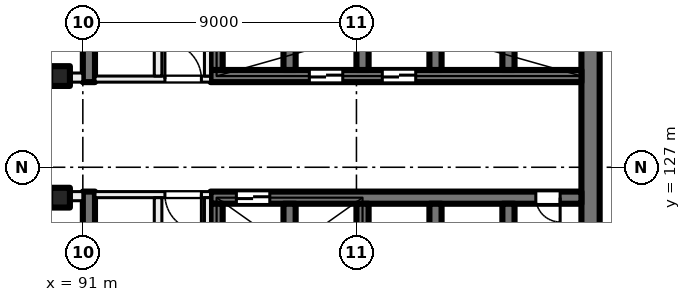
"""IFC4 building model, lengths in metres.
Left out: names, types, materials, properties, quantities, classifications, styles, units other than length and angle.
Written with IfcOpenShell. Run it as: python <this file> out.ifc"""

import sys

from ifc_helpers import new_model, si_unit, direction, frame, frame_2d, origin, origin_2d, place, context, subcontext, project, spatial, rectangle, extrude, element, fill, save


model = new_model("IFC4")
c1 = context("Model", 3, precision=1e-05, world=origin(), true_north=direction((0.0, 1.0)))
c2 = subcontext(c1, "Body", "Model", "MODEL_VIEW")
j1 = project(units=[si_unit("LENGTHUNIT", "METRE"), si_unit("PLANEANGLEUNIT", "RADIAN")], contexts=[c1])
p1 = place(None, origin())
s1 = spatial("IfcSite", under=j1, at=p1, CompositionType="ELEMENT")
p2 = place(p1, origin())
s2 = spatial("IfcBuilding", under=s1, at=p2, CompositionType="ELEMENT")
p3 = place(p2, frame((0.0, 0.0, 81.0)))
s3 = spatial("IfcBuildingStorey", under=s2, at=p3, CompositionType="ELEMENT", Elevation=81.0)
for number, where, z_axis, x_axis in (
    (1, (90.25, 130.0, 0.0), (0.0, 0.0, 1.0), (1.0, 0.0, 0.0)),
    (2, (90.25, 126.0, 0.0), (0.0, 0.0, 1.0), (1.0, 0.0, 0.0)),
):
    element("IfcColumn", number, at=place(p3, frame(where, z_axis=z_axis, x_axis=x_axis)), inside=s3, PredefinedType="COLUMN", context=c2, shape_type="SweptSolid", body=[
        extrude(rectangle(XDim=0.65, YDim=0.65, at=origin_2d()), origin(), (0.0, 0.0, 1.0), 4.0),
    ])
p4 = place(p3, frame((107.7, 135.2, 0.0), z_axis=(0.0, 0.0, 1.0), x_axis=(0.0, -1.0, 0.0)))
e3 = element("IfcWall", 3, at=p4, inside=s3, PredefinedType="SHEAR", context=c2, shape_type="SweptSolid", body=[
    extrude(rectangle(XDim=14.4, YDim=0.6, at=frame_2d((7.2, 0.0))), origin(), (0.0, 0.0, 1.0), 4.0),
])
p5 = place(p3, frame((107.4, 130.0, 0.0), z_axis=(0.0, 0.0, 1.0), x_axis=(-1.0, 0.0, 0.0)))
e4 = element("IfcWall", 4, at=p5, inside=s3, PredefinedType="SHEAR", context=c2, shape_type="SweptSolid", body=[
    extrude(rectangle(XDim=12.2, YDim=0.4, at=frame_2d((6.1, 0.0))), origin(), (0.0, 0.0, 1.0), 4.0),
])
p6 = place(p5, frame((5.45, 0.0, 0.0)))
e5 = element("IfcOpeningElement", 5, at=p6, cuts=e4, PredefinedType="OPENING", context=c2, shape_type="SweptSolid", body=[
    extrude(rectangle(XDim=1.1, YDim=2.1, at=frame_2d((0.55, 1.05))), frame((0.0, 0.21, 0.0), z_axis=(0.0, -1.0, 0.0), x_axis=(1.0, 0.0, 0.0)), (0.0, 0.0, 1.0), 0.42),
])
p7 = place(p5, frame((7.85, 0.0, 0.0)))
e6 = element("IfcOpeningElement", 6, at=p7, cuts=e4, PredefinedType="OPENING", context=c2, shape_type="SweptSolid", body=[
    extrude(rectangle(XDim=1.1, YDim=2.1, at=frame_2d((0.55, 1.05))), frame((0.0, 0.21, 0.0), z_axis=(0.0, -1.0, 0.0), x_axis=(1.0, 0.0, 0.0)), (0.0, 0.0, 1.0), 0.42),
])
for number, where, z_axis, x_axis in (
    (7, (105.0, 133.2, 0.0), (0.0, 0.0, 1.0), (0.0, -1.0, 0.0)),
    (8, (102.6, 133.2, 0.0), (0.0, 0.0, 1.0), (0.0, -1.0, 0.0)),
    (9, (100.2, 133.2, 0.0), (0.0, 0.0, 1.0), (0.0, -1.0, 0.0)),
    (10, (97.8, 133.2, 0.0), (0.0, 0.0, 1.0), (0.0, -1.0, 0.0)),
    (11, (95.4, 133.2, 0.0), (0.0, 0.0, 1.0), (0.0, -1.0, 0.0)),
):
    element("IfcWall", number, at=place(p3, frame(where, z_axis=z_axis, x_axis=x_axis)), inside=s3, PredefinedType="SHEAR", context=c2, shape_type="SweptSolid", body=[
        extrude(rectangle(XDim=3.0, YDim=0.4, at=frame_2d((1.5, 0.0))), origin(), (0.0, 0.0, 1.0), 4.0),
    ])
p8 = place(p3, frame((107.4, 126.0, 0.0), z_axis=(0.0, 0.0, 1.0), x_axis=(-1.0, 0.0, 0.0)))
e12 = element("IfcWall", 12, at=p8, inside=s3, PredefinedType="SHEAR", context=c2, shape_type="SweptSolid", body=[
    extrude(rectangle(XDim=12.2, YDim=0.4, at=frame_2d((6.1, 0.0))), origin(), (0.0, 0.0, 1.0), 4.0),
])
p9 = place(p8, frame((10.25, 0.0, 0.0)))
e13 = element("IfcOpeningElement", 13, at=p9, cuts=e12, PredefinedType="OPENING", context=c2, shape_type="SweptSolid", body=[
    extrude(rectangle(XDim=1.1, YDim=2.1, at=frame_2d((0.55, 1.05))), frame((0.0, 0.21, 0.0), z_axis=(0.0, -1.0, 0.0), x_axis=(1.0, 0.0, 0.0)), (0.0, 0.0, 1.0), 0.42),
])
p10 = place(p8, frame((0.7, 0.0, 0.0)))
e14 = element("IfcOpeningElement", 14, at=p10, cuts=e12, PredefinedType="OPENING", context=c2, shape_type="SweptSolid", body=[
    extrude(rectangle(XDim=0.8, YDim=2.1, at=frame_2d((0.4, 1.05))), frame((0.0, 0.21, 0.0), z_axis=(0.0, -1.0, 0.0), x_axis=(1.0, 0.0, 0.0)), (0.0, 0.0, 1.0), 0.42),
])
for number, where, z_axis, x_axis in (
    (15, (105.0, 125.8, 0.0), (0.0, 0.0, 1.0), (0.0, -1.0, 0.0)),
    (16, (102.6, 125.8, 0.0), (0.0, 0.0, 1.0), (0.0, -1.0, 0.0)),
    (17, (100.2, 125.8, 0.0), (0.0, 0.0, 1.0), (0.0, -1.0, 0.0)),
    (18, (97.8, 125.8, 0.0), (0.0, 0.0, 1.0), (0.0, -1.0, 0.0)),
    (19, (95.4, 125.8, 0.0), (0.0, 0.0, 1.0), (0.0, -1.0, 0.0)),
):
    element("IfcWall", number, at=place(p3, frame(where, z_axis=z_axis, x_axis=x_axis)), inside=s3, PredefinedType="SHEAR", context=c2, shape_type="SweptSolid", body=[
        extrude(rectangle(XDim=3.0, YDim=0.4, at=frame_2d((1.5, 0.0))), origin(), (0.0, 0.0, 1.0), 4.0),
    ])
for number, where, z_axis, x_axis in (
    (20, (91.2, 138.4, 0.0), (0.0, 0.0, 1.0), (0.0, -1.0, 0.0)),
    (21, (91.2, 126.2, 0.0), (0.0, 0.0, 1.0), (0.0, -1.0, 0.0)),
):
    element("IfcWall", number, at=place(p3, frame(where, z_axis=z_axis, x_axis=x_axis)), inside=s3, PredefinedType="SHEAR", context=c2, shape_type="SweptSolid", body=[
        extrude(rectangle(XDim=8.6, YDim=0.4, at=frame_2d((4.3, 0.0))), origin(), (0.0, 0.0, 1.0), 4.0),
    ])
p11 = place(p3, frame((95.2, 126.1, 0.0), z_axis=(0.0, 0.0, 1.0), x_axis=(-1.0, 0.0, 0.0)))
e22 = element("IfcWall", 22, at=p11, inside=s3, PredefinedType="PARTITIONING", context=c2, shape_type="SweptSolid", body=[
    extrude(rectangle(XDim=3.8, YDim=0.2, at=frame_2d((1.9, 0.0))), origin(), (0.0, 0.0, 1.0), 3.625),
])
p12 = place(p11, frame((0.3, 0.0, 0.0)))
e23 = element("IfcOpeningElement", 23, at=p12, cuts=e22, PredefinedType="OPENING", context=c2, shape_type="SweptSolid", body=[
    extrude(rectangle(XDim=1.2, YDim=2.1, at=frame_2d((0.6, 1.05))), frame((0.0, 0.11, 0.0), z_axis=(0.0, -1.0, 0.0), x_axis=(1.0, 0.0, 0.0)), (0.0, 0.0, 1.0), 0.22),
])
p13 = place(p3, frame((95.1, 117.6, 0.0), z_axis=(0.0, 0.0, 1.0), x_axis=(0.0, 1.0, 0.0)))
e24 = element("IfcWall", 24, at=p13, inside=s3, PredefinedType="PARTITIONING", context=c2, shape_type="SweptSolid", body=[
    extrude(rectangle(XDim=8.4, YDim=0.2, at=frame_2d((4.2, 0.0))), origin(), (0.0, 0.0, 1.0), 3.625),
])
p14 = place(p13, frame((1.65, 0.0, 0.0)))
e25 = element("IfcOpeningElement", 25, at=p14, cuts=e24, PredefinedType="OPENING", context=c2, shape_type="SweptSolid", body=[
    extrude(rectangle(XDim=1.5, YDim=2.1, at=frame_2d((0.75, 1.05))), frame((0.0, 0.11, 0.0), z_axis=(0.0, -1.0, 0.0), x_axis=(1.0, 0.0, 0.0)), (0.0, 0.0, 1.0), 0.22),
])
p15 = place(p3, frame((93.475, 117.6, 0.0), z_axis=(0.0, 0.0, 1.0), x_axis=(0.0, 1.0, 0.0)))
e26 = element("IfcWall", 26, at=p15, inside=s3, PredefinedType="PARTITIONING", context=c2, shape_type="SweptSolid", body=[
    extrude(rectangle(XDim=8.4, YDim=0.25, at=frame_2d((4.2, 0.0))), origin(), (0.0, 0.0, 1.0), 3.625),
])
p16 = place(p15, frame((5.925, 0.0, 0.0)))
e27 = element("IfcOpeningElement", 27, at=p16, cuts=e26, PredefinedType="OPENING", context=c2, shape_type="SweptSolid", body=[
    extrude(rectangle(XDim=0.8, YDim=2.1, at=frame_2d((0.4, 1.05))), frame((0.0, 0.135, 0.0), z_axis=(0.0, -1.0, 0.0), x_axis=(1.0, 0.0, 0.0)), (0.0, 0.0, 1.0), 0.27),
])
p17 = place(p15, frame((1.575, 0.0, 0.0)))
e28 = element("IfcOpeningElement", 28, at=p17, cuts=e26, PredefinedType="OPENING", context=c2, shape_type="SweptSolid", body=[
    extrude(rectangle(XDim=1.0, YDim=2.1, at=frame_2d((0.5, 1.05))), frame((0.0, 0.135, 0.0), z_axis=(0.0, -1.0, 0.0), x_axis=(1.0, 0.0, 0.0)), (0.0, 0.0, 1.0), 0.27),
])
p18 = place(p3, frame((91.4, 129.9, 0.0), z_axis=(0.0, 0.0, 1.0), x_axis=(1.0, 0.0, 0.0)))
e29 = element("IfcWall", 29, at=p18, inside=s3, PredefinedType="PARTITIONING", context=c2, shape_type="SweptSolid", body=[
    extrude(rectangle(XDim=3.8, YDim=0.2, at=frame_2d((1.9, 0.0))), origin(), (0.0, 0.0, 1.0), 3.625),
])
p19 = place(p18, frame((2.3, 0.0, 0.0)))
e30 = element("IfcOpeningElement", 30, at=p19, cuts=e29, PredefinedType="OPENING", context=c2, shape_type="SweptSolid", body=[
    extrude(rectangle(XDim=1.2, YDim=2.1, at=frame_2d((0.6, 1.05))), frame((0.0, 0.11, 0.0), z_axis=(0.0, -1.0, 0.0), x_axis=(1.0, 0.0, 0.0)), (0.0, 0.0, 1.0), 0.22),
])
p20 = place(p3, frame((95.1, 130.0, 0.0), z_axis=(0.0, 0.0, 1.0), x_axis=(0.0, 1.0, 0.0)))
e31 = element("IfcWall", 31, at=p20, inside=s3, PredefinedType="PARTITIONING", context=c2, shape_type="SweptSolid", body=[
    extrude(rectangle(XDim=8.4, YDim=0.2, at=frame_2d((4.2, 0.0))), origin(), (0.0, 0.0, 1.0), 3.625),
])
p21 = place(p20, frame((5.25, 0.0, 0.0)))
e32 = element("IfcOpeningElement", 32, at=p21, cuts=e31, PredefinedType="OPENING", context=c2, shape_type="SweptSolid", body=[
    extrude(rectangle(XDim=1.5, YDim=2.1, at=frame_2d((0.75, 1.05))), frame((0.0, 0.11, 0.0), z_axis=(0.0, -1.0, 0.0), x_axis=(1.0, 0.0, 0.0)), (0.0, 0.0, 1.0), 0.22),
])
p22 = place(p3, frame((93.475, 130.0, 0.0), z_axis=(0.0, 0.0, 1.0), x_axis=(0.0, 1.0, 0.0)))
e33 = element("IfcWall", 33, at=p22, inside=s3, PredefinedType="PARTITIONING", context=c2, shape_type="SweptSolid", body=[
    extrude(rectangle(XDim=8.4, YDim=0.25, at=frame_2d((4.2, 0.0))), origin(), (0.0, 0.0, 1.0), 3.625),
])
p23 = place(p22, frame((3.8, 0.0, 0.0)))
e34 = element("IfcOpeningElement", 34, at=p23, cuts=e33, PredefinedType="OPENING", context=c2, shape_type="SweptSolid", body=[
    extrude(rectangle(XDim=0.8, YDim=2.1, at=frame_2d((0.4, 1.05))), frame((0.0, 0.135, 0.0), z_axis=(0.0, -1.0, 0.0), x_axis=(1.0, 0.0, 0.0)), (0.0, 0.0, 1.0), 0.27),
])
p24 = place(p3, frame((72.5, 129.95, 0.0), z_axis=(0.0, 0.0, 1.0), x_axis=(1.0, 0.0, 0.0)))
e35 = element("IfcWall", 35, at=p24, inside=s3, PredefinedType="PARTITIONING", context=c2, shape_type="SweptSolid", body=[
    extrude(rectangle(XDim=18.5, YDim=0.3, at=frame_2d((9.25, 0.0))), origin(), (0.0, 0.0, 1.0), 3.625),
])
p25 = place(p24, frame((14.375, 0.0, 0.0)))
e36 = element("IfcOpeningElement", 36, at=p25, cuts=e35, PredefinedType="OPENING", context=c2, shape_type="SweptSolid", body=[
    extrude(rectangle(XDim=1.0, YDim=2.1, at=frame_2d((0.5, 1.05))), frame((0.0, 0.16, 0.0), z_axis=(0.0, -1.0, 0.0), x_axis=(1.0, 0.0, 0.0)), (0.0, 0.0, 1.0), 0.32),
])
p26 = place(p24, frame((6.0, 0.0, 0.0)))
e37 = element("IfcOpeningElement", 37, at=p26, cuts=e35, PredefinedType="OPENING", context=c2, shape_type="SweptSolid", body=[
    extrude(rectangle(XDim=1.0, YDim=2.1, at=frame_2d((0.5, 1.05))), frame((0.0, 0.16, 0.0), z_axis=(0.0, -1.0, 0.0), x_axis=(1.0, 0.0, 0.0)), (0.0, 0.0, 1.0), 0.32),
])
p27 = place(p24, frame((1.625, 0.0, 0.0)))
e38 = element("IfcOpeningElement", 38, at=p27, cuts=e35, PredefinedType="OPENING", context=c2, shape_type="SweptSolid", body=[
    extrude(rectangle(XDim=1.0, YDim=2.1, at=frame_2d((0.5, 1.05))), frame((0.0, 0.16, 0.0), z_axis=(0.0, -1.0, 0.0), x_axis=(1.0, 0.0, 0.0)), (0.0, 0.0, 1.0), 0.32),
])
p28 = place(p3, frame((91.0, 126.05, 0.0), z_axis=(0.0, 0.0, 1.0), x_axis=(-1.0, 0.0, 0.0)))
e39 = element("IfcWall", 39, at=p28, inside=s3, PredefinedType="PARTITIONING", context=c2, shape_type="SweptSolid", body=[
    extrude(rectangle(XDim=43.785, YDim=0.3, at=frame_2d((21.893, 0.0))), origin(), (0.0, 0.0, 1.0), 3.625),
])
p29 = place(p28, frame((2.025, 0.0, 0.0)))
e40 = element("IfcOpeningElement", 40, at=p29, cuts=e39, PredefinedType="OPENING", context=c2, shape_type="SweptSolid", body=[
    extrude(rectangle(XDim=1.2, YDim=2.1, at=frame_2d((0.6, 1.05))), frame((0.0, 0.16, 0.0), z_axis=(0.0, -1.0, 0.0), x_axis=(1.0, 0.0, 0.0)), (0.0, 0.0, 1.0), 0.32),
])
p30 = place(p28, frame((7.0, 0.0, 0.0)))
e41 = element("IfcOpeningElement", 41, at=p30, cuts=e39, PredefinedType="OPENING", context=c2, shape_type="SweptSolid", body=[
    extrude(rectangle(XDim=1.0, YDim=2.1, at=frame_2d((0.5, 1.05))), frame((0.0, 0.16, 0.0), z_axis=(0.0, -1.0, 0.0), x_axis=(1.0, 0.0, 0.0)), (0.0, 0.0, 1.0), 0.32),
])
p31 = place(p28, frame((16.0, 0.0, 0.0)))
e42 = element("IfcOpeningElement", 42, at=p31, cuts=e39, PredefinedType="OPENING", context=c2, shape_type="SweptSolid", body=[
    extrude(rectangle(XDim=1.0, YDim=2.1, at=frame_2d((0.5, 1.05))), frame((0.0, 0.16, 0.0), z_axis=(0.0, -1.0, 0.0), x_axis=(1.0, 0.0, 0.0)), (0.0, 0.0, 1.0), 0.32),
])
p32 = place(p28, frame((28.85, 0.0, 0.0)))
e43 = element("IfcOpeningElement", 43, at=p32, cuts=e39, PredefinedType="OPENING", context=c2, shape_type="SweptSolid", body=[
    extrude(rectangle(XDim=1.8, YDim=2.1, at=frame_2d((0.9, 1.05))), frame((0.0, 0.16, 0.0), z_axis=(0.0, -1.0, 0.0), x_axis=(1.0, 0.0, 0.0)), (0.0, 0.0, 1.0), 0.32),
])
p33 = place(p28, frame((39.296, 0.0, 0.0)))
e44 = element("IfcOpeningElement", 44, at=p33, cuts=e39, PredefinedType="OPENING", context=c2, shape_type="SweptSolid", body=[
    extrude(rectangle(XDim=1.8, YDim=2.1, at=frame_2d((0.9, 1.05))), frame((0.0, 0.16, 0.0), z_axis=(0.0, -1.0, 0.0), x_axis=(1.0, 0.0, 0.0)), (0.0, 0.0, 1.0), 0.32),
])
p34 = place(p9, origin())
e45 = element("IfcDoor", 45, at=p34, inside=s3, OperationType="DOUBLE_DOOR_SLIDING", PredefinedType="DOOR", context=c2, shape_type="SweptSolid", body=[
    extrude(rectangle(XDim=1.1, YDim=2.1, at=frame_2d((0.55, 1.05))), frame((0.0, 0.025, 0.0), z_axis=(0.0, -1.0, 0.0), x_axis=(1.0, 0.0, 0.0)), (0.0, 0.0, 1.0), 0.05),
])
fill(e13, e45)
p35 = place(p6, origin())
e46 = element("IfcDoor", 46, at=p35, inside=s3, OperationType="DOUBLE_DOOR_SLIDING", PredefinedType="DOOR", context=c2, shape_type="SweptSolid", body=[
    extrude(rectangle(XDim=1.1, YDim=2.1, at=frame_2d((0.55, 1.05))), frame((0.0, 0.025, 0.0), z_axis=(0.0, -1.0, 0.0), x_axis=(1.0, 0.0, 0.0)), (0.0, 0.0, 1.0), 0.05),
])
fill(e5, e46)
p36 = place(p7, origin())
e47 = element("IfcDoor", 47, at=p36, inside=s3, OperationType="DOUBLE_DOOR_SLIDING", PredefinedType="DOOR", context=c2, shape_type="SweptSolid", body=[
    extrude(rectangle(XDim=1.1, YDim=2.1, at=frame_2d((0.55, 1.05))), frame((0.0, 0.025, 0.0), z_axis=(0.0, -1.0, 0.0), x_axis=(1.0, 0.0, 0.0)), (0.0, 0.0, 1.0), 0.05),
])
fill(e6, e47)
p37 = place(p10, origin())
e48 = element("IfcDoor", 48, at=p37, inside=s3, OperationType="SINGLE_SWING_LEFT", PredefinedType="DOOR", context=c2, shape_type="SweptSolid", body=[
    extrude(rectangle(XDim=0.8, YDim=2.1, at=frame_2d((0.4, 1.05))), frame((0.0, 0.025, 0.0), z_axis=(0.0, -1.0, 0.0), x_axis=(1.0, 0.0, 0.0)), (0.0, 0.0, 1.0), 0.05),
])
fill(e14, e48)
p38 = place(p12, origin())
e49 = element("IfcDoor", 49, at=p38, inside=s3, OperationType="DOUBLE_DOOR_SINGLE_SWING", PredefinedType="DOOR", context=c2, shape_type="SweptSolid", body=[
    extrude(rectangle(XDim=1.2, YDim=2.1, at=frame_2d((0.6, 1.05))), frame((0.0, 0.025, 0.0), z_axis=(0.0, -1.0, 0.0), x_axis=(1.0, 0.0, 0.0)), (0.0, 0.0, 1.0), 0.05),
])
fill(e23, e49)
p39 = place(p19, origin())
e50 = element("IfcDoor", 50, at=p39, inside=s3, OperationType="DOUBLE_DOOR_SINGLE_SWING", PredefinedType="DOOR", context=c2, shape_type="SweptSolid", body=[
    extrude(rectangle(XDim=1.2, YDim=2.1, at=frame_2d((0.6, 1.05))), frame((0.0, 0.025, 0.0), z_axis=(0.0, -1.0, 0.0), x_axis=(1.0, 0.0, 0.0)), (0.0, 0.0, 1.0), 0.05),
])
fill(e30, e50)
save(model, sys.argv[1])
